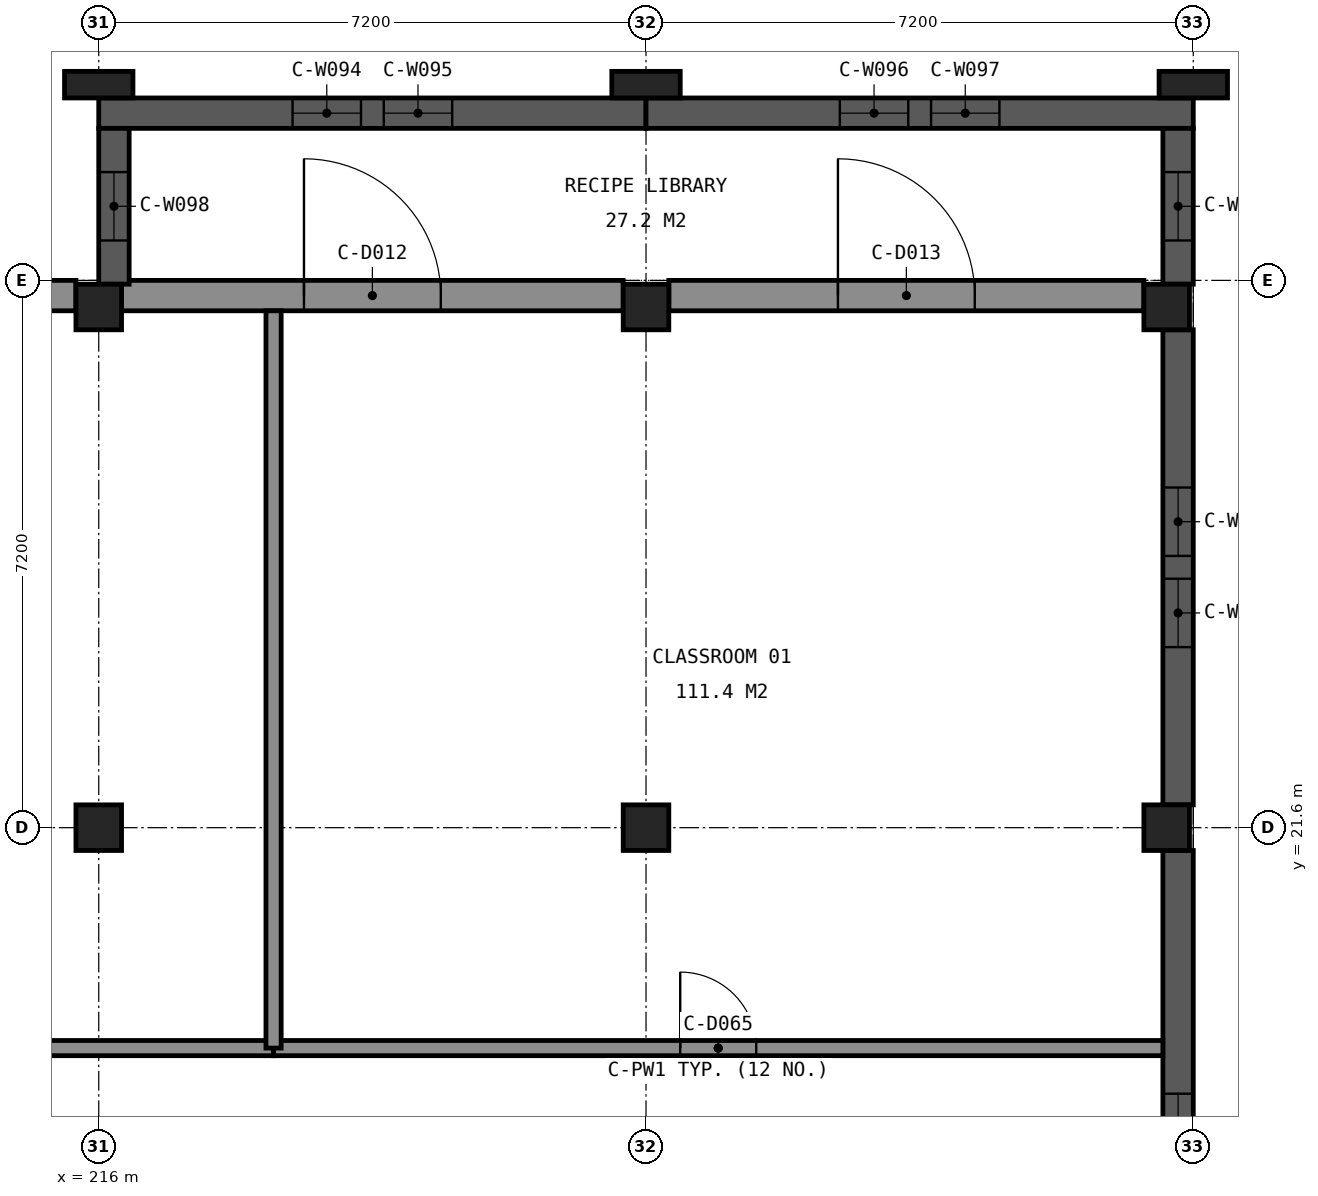
"""IFC4 building model, lengths in metres.
Left out: names, types, materials, properties, quantities, classifications, styles, units other than length and angle.
Written with IfcOpenShell. Run it as: python <this file> out.ifc"""

import sys

from ifc_helpers import new_model, si_unit, direction, frame, frame_2d, origin, origin_2d, place, context, subcontext, project, spatial, rectangle, extrude, element, fill, save


model = new_model("IFC4")
c1 = context("Model", 3, precision=1e-05, world=origin(), true_north=direction((0.0, 1.0)))
c2 = subcontext(c1, "Body", "Model", "MODEL_VIEW")
j1 = project(units=[si_unit("LENGTHUNIT", "METRE"), si_unit("PLANEANGLEUNIT", "RADIAN")], contexts=[c1])
p1 = place(None, origin())
s1 = spatial("IfcSite", under=j1, at=p1, CompositionType="ELEMENT")
p2 = place(p1, origin())
s2 = spatial("IfcBuilding", under=s1, at=p2, CompositionType="ELEMENT")
p3 = place(p2, frame((0.0, 0.0, 9.6)))
s3 = spatial("IfcBuildingStorey", under=s2, at=p3, CompositionType="ELEMENT", Elevation=9.6)
for number, where, z_axis, x_axis in (
    (1, (216.0, 28.45, 0.0), (0.0, 0.0, 1.0), (1.0, 0.0, 0.0)),
    (2, (223.2, 28.45, 0.0), (0.0, 0.0, 1.0), (1.0, 0.0, 0.0)),
    (3, (230.05, 28.45, 0.0), (0.0, 0.0, 1.0), (1.0, 0.0, 0.0)),
    (4, (216.0, 21.6, 0.0), (0.0, 0.0, 1.0), (1.0, 0.0, 0.0)),
    (5, (223.2, 21.6, 0.0), (0.0, 0.0, 1.0), (1.0, 0.0, 0.0)),
    (6, (230.05, 21.6, 0.0), (0.0, 0.0, 1.0), (1.0, 0.0, 0.0)),
):
    element("IfcColumn", number, at=place(p3, frame(where, z_axis=z_axis, x_axis=x_axis)), inside=s3, PredefinedType="COLUMN", context=c2, shape_type="SweptSolid", body=[
        extrude(rectangle(XDim=0.6, YDim=0.6, at=origin_2d()), origin(), (0.0, 0.0, 1.0), 4.8),
    ])
p4 = place(p3, frame((209.1, 28.6, 0.0), z_axis=(0.0, 0.0, 1.0), x_axis=(1.0, 0.0, 0.0)))
e7 = element("IfcWall", 7, at=p4, inside=s3, PredefinedType="SOLIDWALL", context=c2, shape_type="SweptSolid", body=[
    extrude(rectangle(XDim=6.6, YDim=0.4, at=frame_2d((3.3, 0.0))), origin(), (0.0, 0.0, 1.0), 3.95),
])
p5 = place(p4, frame((2.25, 0.0, 0.9)))
e8 = element("IfcOpeningElement", 8, at=p5, cuts=e7, PredefinedType="OPENING", context=c2, shape_type="SweptSolid", body=[
    extrude(rectangle(XDim=0.9, YDim=2.7, at=frame_2d((0.45, 1.35))), frame((0.0, 0.21, 0.0), z_axis=(0.0, -1.0, 0.0), x_axis=(1.0, 0.0, 0.0)), (0.0, 0.0, 1.0), 0.42),
])
p6 = place(p4, frame((3.45, 0.0, 0.9)))
e9 = element("IfcOpeningElement", 9, at=p6, cuts=e7, PredefinedType="OPENING", context=c2, shape_type="SweptSolid", body=[
    extrude(rectangle(XDim=0.9, YDim=2.7, at=frame_2d((0.45, 1.35))), frame((0.0, 0.21, 0.0), z_axis=(0.0, -1.0, 0.0), x_axis=(1.0, 0.0, 0.0)), (0.0, 0.0, 1.0), 0.42),
])
p7 = place(p3, frame((216.3, 28.6, 0.0), z_axis=(0.0, 0.0, 1.0), x_axis=(1.0, 0.0, 0.0)))
e10 = element("IfcWall", 10, at=p7, inside=s3, PredefinedType="SOLIDWALL", context=c2, shape_type="SweptSolid", body=[
    extrude(rectangle(XDim=6.6, YDim=0.4, at=frame_2d((3.3, 0.0))), origin(), (0.0, 0.0, 1.0), 3.95),
])
p8 = place(p7, frame((2.4, 0.0, 0.0)))
e11 = element("IfcOpeningElement", 11, at=p8, cuts=e10, PredefinedType="OPENING", context=c2, shape_type="SweptSolid", body=[
    extrude(rectangle(XDim=1.8, YDim=2.1, at=frame_2d((0.9, 1.05))), frame((0.0, 0.21, 0.0), z_axis=(0.0, -1.0, 0.0), x_axis=(1.0, 0.0, 0.0)), (0.0, 0.0, 1.0), 0.42),
])
p9 = place(p3, frame((223.5, 28.6, 0.0), z_axis=(0.0, 0.0, 1.0), x_axis=(1.0, 0.0, 0.0)))
e12 = element("IfcWall", 12, at=p9, inside=s3, PredefinedType="SOLIDWALL", context=c2, shape_type="SweptSolid", body=[
    extrude(rectangle(XDim=6.25, YDim=0.4, at=frame_2d((3.125, 0.0))), origin(), (0.0, 0.0, 1.0), 3.95),
])
p10 = place(p9, frame((2.225, 0.0, 0.0)))
e13 = element("IfcOpeningElement", 13, at=p10, cuts=e12, PredefinedType="OPENING", context=c2, shape_type="SweptSolid", body=[
    extrude(rectangle(XDim=1.8, YDim=2.1, at=frame_2d((0.9, 1.05))), frame((0.0, 0.21, 0.0), z_axis=(0.0, -1.0, 0.0), x_axis=(1.0, 0.0, 0.0)), (0.0, 0.0, 1.0), 0.42),
])
p11 = place(p3, frame((230.2, 28.15, 0.0), z_axis=(0.0, 0.0, 1.0), x_axis=(0.0, -1.0, 0.0)))
e14 = element("IfcWall", 14, at=p11, inside=s3, PredefinedType="SHEAR", context=c2, shape_type="SweptSolid", body=[
    extrude(rectangle(XDim=6.25, YDim=0.4, at=frame_2d((3.125, 0.0))), origin(), (0.0, 0.0, 1.0), 3.95),
])
p12 = place(p11, frame((2.075, 0.0, 0.9)))
e15 = element("IfcOpeningElement", 15, at=p12, cuts=e14, PredefinedType="OPENING", context=c2, shape_type="SweptSolid", body=[
    extrude(rectangle(XDim=0.9, YDim=2.7, at=frame_2d((0.45, 1.35))), frame((0.0, 0.21, 0.0), z_axis=(0.0, -1.0, 0.0), x_axis=(1.0, 0.0, 0.0)), (0.0, 0.0, 1.0), 0.42),
])
p13 = place(p11, frame((3.275, 0.0, 0.9)))
e16 = element("IfcOpeningElement", 16, at=p13, cuts=e14, PredefinedType="OPENING", context=c2, shape_type="SweptSolid", body=[
    extrude(rectangle(XDim=0.9, YDim=2.7, at=frame_2d((0.45, 1.35))), frame((0.0, 0.21, 0.0), z_axis=(0.0, -1.0, 0.0), x_axis=(1.0, 0.0, 0.0)), (0.0, 0.0, 1.0), 0.42),
])
p14 = place(p3, frame((230.2, 21.3, 0.0), z_axis=(0.0, 0.0, 1.0), x_axis=(0.0, -1.0, 0.0)))
e17 = element("IfcWall", 17, at=p14, inside=s3, PredefinedType="SHEAR", context=c2, shape_type="SweptSolid", body=[
    extrude(rectangle(XDim=6.1, YDim=0.4, at=frame_2d((3.05, 0.0))), origin(), (0.0, 0.0, 1.0), 3.95),
])
p15 = place(p14, frame((3.2, 0.0, 0.9)))
e18 = element("IfcOpeningElement", 18, at=p15, cuts=e17, PredefinedType="OPENING", context=c2, shape_type="SweptSolid", body=[
    extrude(rectangle(XDim=0.9, YDim=2.7, at=frame_2d((0.45, 1.35))), frame((0.0, 0.21, 0.0), z_axis=(0.0, -1.0, 0.0), x_axis=(1.0, 0.0, 0.0)), (0.0, 0.0, 1.0), 0.42),
])
p16 = place(p3, frame((216.0, 31.0, 0.0), z_axis=(0.0, 0.0, 1.0), x_axis=(1.0, 0.0, 0.0)))
e19 = element("IfcWall", 19, at=p16, inside=s3, PredefinedType="SOLIDWALL", context=c2, shape_type="SweptSolid", body=[
    extrude(rectangle(XDim=7.2, YDim=0.4, at=frame_2d((3.6, 0.0))), origin(), (0.0, 0.0, 1.0), 4.55),
])
p17 = place(p16, frame((2.55, 0.0, 0.9)))
e20 = element("IfcOpeningElement", 20, at=p17, cuts=e19, PredefinedType="OPENING", context=c2, shape_type="SweptSolid", body=[
    extrude(rectangle(XDim=0.9, YDim=2.7, at=frame_2d((0.45, 1.35))), frame((0.0, 0.21, 0.0), z_axis=(0.0, -1.0, 0.0), x_axis=(1.0, 0.0, 0.0)), (0.0, 0.0, 1.0), 0.42),
])
p18 = place(p16, frame((3.75, 0.0, 0.9)))
e21 = element("IfcOpeningElement", 21, at=p18, cuts=e19, PredefinedType="OPENING", context=c2, shape_type="SweptSolid", body=[
    extrude(rectangle(XDim=0.9, YDim=2.7, at=frame_2d((0.45, 1.35))), frame((0.0, 0.21, 0.0), z_axis=(0.0, -1.0, 0.0), x_axis=(1.0, 0.0, 0.0)), (0.0, 0.0, 1.0), 0.42),
])
p19 = place(p3, frame((223.2, 31.0, 0.0), z_axis=(0.0, 0.0, 1.0), x_axis=(1.0, 0.0, 0.0)))
e22 = element("IfcWall", 22, at=p19, inside=s3, PredefinedType="SOLIDWALL", context=c2, shape_type="SweptSolid", body=[
    extrude(rectangle(XDim=7.2, YDim=0.4, at=frame_2d((3.6, 0.0))), origin(), (0.0, 0.0, 1.0), 4.55),
])
p20 = place(p19, frame((2.55, 0.0, 0.9)))
e23 = element("IfcOpeningElement", 23, at=p20, cuts=e22, PredefinedType="OPENING", context=c2, shape_type="SweptSolid", body=[
    extrude(rectangle(XDim=0.9, YDim=2.7, at=frame_2d((0.45, 1.35))), frame((0.0, 0.21, 0.0), z_axis=(0.0, -1.0, 0.0), x_axis=(1.0, 0.0, 0.0)), (0.0, 0.0, 1.0), 0.42),
])
p21 = place(p19, frame((3.75, 0.0, 0.9)))
e24 = element("IfcOpeningElement", 24, at=p21, cuts=e22, PredefinedType="OPENING", context=c2, shape_type="SweptSolid", body=[
    extrude(rectangle(XDim=0.9, YDim=2.7, at=frame_2d((0.45, 1.35))), frame((0.0, 0.21, 0.0), z_axis=(0.0, -1.0, 0.0), x_axis=(1.0, 0.0, 0.0)), (0.0, 0.0, 1.0), 0.42),
])
p22 = place(p3, frame((216.2, 28.75, 0.0), z_axis=(0.0, 0.0, 1.0), x_axis=(0.0, 1.0, 0.0)))
e25 = element("IfcWall", 25, at=p22, inside=s3, PredefinedType="SOLIDWALL", context=c2, shape_type="SweptSolid", body=[
    extrude(rectangle(XDim=2.05, YDim=0.4, at=frame_2d((1.025, 0.0))), origin(), (0.0, 0.0, 1.0), 4.55),
])
p23 = place(p22, frame((0.575, 0.0, 0.9)))
e26 = element("IfcOpeningElement", 26, at=p23, cuts=e25, PredefinedType="OPENING", context=c2, shape_type="SweptSolid", body=[
    extrude(rectangle(XDim=0.9, YDim=2.7, at=frame_2d((0.45, 1.35))), frame((0.0, 0.21, 0.0), z_axis=(0.0, -1.0, 0.0), x_axis=(1.0, 0.0, 0.0)), (0.0, 0.0, 1.0), 0.42),
])
p24 = place(p3, frame((230.2, 30.8, 0.0), z_axis=(0.0, 0.0, 1.0), x_axis=(0.0, -1.0, 0.0)))
e27 = element("IfcWall", 27, at=p24, inside=s3, PredefinedType="SOLIDWALL", context=c2, shape_type="SweptSolid", body=[
    extrude(rectangle(XDim=2.05, YDim=0.4, at=frame_2d((1.025, 0.0))), origin(), (0.0, 0.0, 1.0), 4.55),
])
p25 = place(p24, frame((0.575, 0.0, 0.9)))
e28 = element("IfcOpeningElement", 28, at=p25, cuts=e27, PredefinedType="OPENING", context=c2, shape_type="SweptSolid", body=[
    extrude(rectangle(XDim=0.9, YDim=2.7, at=frame_2d((0.45, 1.35))), frame((0.0, 0.21, 0.0), z_axis=(0.0, -1.0, 0.0), x_axis=(1.0, 0.0, 0.0)), (0.0, 0.0, 1.0), 0.42),
])
for number, where, z_axis, x_axis in (
    (29, (216.0, 31.375, 0.0), (0.0, 0.0, 1.0), (1.0, 0.0, 0.0)),
    (30, (223.2, 31.375, 0.0), (0.0, 0.0, 1.0), (1.0, 0.0, 0.0)),
    (31, (230.4, 31.375, 0.0), (0.0, 0.0, 1.0), (1.0, 0.0, 0.0)),
):
    element("IfcColumn", number, at=place(p3, frame(where, z_axis=z_axis, x_axis=x_axis)), inside=s3, PredefinedType="PILASTER", context=c2, shape_type="SweptSolid", body=[
        extrude(rectangle(XDim=0.9, YDim=0.35, at=origin_2d()), origin(), (0.0, 0.0, 1.0), 4.8),
    ])
p26 = place(p3, frame((201.3, 18.7, 0.0), z_axis=(0.0, 0.0, 1.0), x_axis=(1.0, 0.0, 0.0)))
e32 = element("IfcWall", 32, at=p26, inside=s3, PredefinedType="PARTITIONING", context=c2, shape_type="SweptSolid", body=[
    extrude(rectangle(XDim=17.0, YDim=0.2, at=frame_2d((8.5, 0.0))), origin(), (0.0, 0.0, 1.0), 3.95),
])
p27 = place(p26, frame((7.6, 0.0, 0.0)))
e33 = element("IfcOpeningElement", 33, at=p27, cuts=e32, PredefinedType="OPENING", context=c2, shape_type="SweptSolid", body=[
    extrude(rectangle(XDim=1.8, YDim=2.1, at=frame_2d((0.9, 1.05))), frame((0.0, 0.11, 0.0), z_axis=(0.0, -1.0, 0.0), x_axis=(1.0, 0.0, 0.0)), (0.0, 0.0, 1.0), 0.22),
])
p28 = place(p3, frame((218.3, 18.7, 0.0), z_axis=(0.0, 0.0, 1.0), x_axis=(1.0, 0.0, 0.0)))
e34 = element("IfcWall", 34, at=p28, inside=s3, PredefinedType="PARTITIONING", context=c2, shape_type="SweptSolid", body=[
    extrude(rectangle(XDim=11.7, YDim=0.2, at=frame_2d((5.85, 0.0))), origin(), (0.0, 0.0, 1.0), 3.95),
])
p29 = place(p28, frame((5.35, 0.0, 0.0)))
e35 = element("IfcOpeningElement", 35, at=p29, cuts=e34, PredefinedType="OPENING", context=c2, shape_type="SweptSolid", body=[
    extrude(rectangle(XDim=1.0, YDim=2.1, at=frame_2d((0.5, 1.05))), frame((0.0, 0.11, 0.0), z_axis=(0.0, -1.0, 0.0), x_axis=(1.0, 0.0, 0.0)), (0.0, 0.0, 1.0), 0.22),
])
p30 = place(p3, frame((218.3, 28.4, 0.0), z_axis=(0.0, 0.0, 1.0), x_axis=(0.0, -1.0, 0.0)))
e36 = element("IfcWall", 36, at=p30, inside=s3, PredefinedType="PARTITIONING", context=c2, shape_type="SweptSolid", body=[
    extrude(rectangle(XDim=9.7, YDim=0.2, at=frame_2d((4.85, 0.0))), origin(), (0.0, 0.0, 1.0), 3.95),
])
p31 = place(p8, origin())
e37 = element("IfcDoor", 37, at=p31, inside=s3, OperationType="NOTDEFINED", PredefinedType="DOOR", context=c2, shape_type="SweptSolid", body=[
    extrude(rectangle(XDim=1.8, YDim=2.1, at=frame_2d((0.9, 1.05))), frame((0.0, 0.025, 0.0), z_axis=(0.0, -1.0, 0.0), x_axis=(1.0, 0.0, 0.0)), (0.0, 0.0, 1.0), 0.05),
])
fill(e11, e37)
p32 = place(p10, origin())
e38 = element("IfcDoor", 38, at=p32, inside=s3, OperationType="NOTDEFINED", PredefinedType="DOOR", context=c2, shape_type="SweptSolid", body=[
    extrude(rectangle(XDim=1.8, YDim=2.1, at=frame_2d((0.9, 1.05))), frame((0.0, 0.025, 0.0), z_axis=(0.0, -1.0, 0.0), x_axis=(1.0, 0.0, 0.0)), (0.0, 0.0, 1.0), 0.05),
])
fill(e13, e38)
p33 = place(p12, origin())
e39 = element("IfcWindow", 39, at=p33, inside=s3, PartitioningType="SINGLE_PANEL", PredefinedType="WINDOW", context=c2, shape_type="SweptSolid", body=[
    extrude(rectangle(XDim=0.9, YDim=2.7, at=frame_2d((0.45, 1.35))), frame((0.0, -0.09, 0.0), z_axis=(0.0, -1.0, 0.0), x_axis=(1.0, 0.0, 0.0)), (0.0, 0.0, 1.0), 0.06),
])
fill(e15, e39)
p34 = place(p13, origin())
e40 = element("IfcWindow", 40, at=p34, inside=s3, PartitioningType="SINGLE_PANEL", PredefinedType="WINDOW", context=c2, shape_type="SweptSolid", body=[
    extrude(rectangle(XDim=0.9, YDim=2.7, at=frame_2d((0.45, 1.35))), frame((0.0, -0.09, 0.0), z_axis=(0.0, -1.0, 0.0), x_axis=(1.0, 0.0, 0.0)), (0.0, 0.0, 1.0), 0.06),
])
fill(e16, e40)
p35 = place(p15, origin())
e41 = element("IfcWindow", 41, at=p35, inside=s3, PartitioningType="SINGLE_PANEL", PredefinedType="WINDOW", context=c2, shape_type="SweptSolid", body=[
    extrude(rectangle(XDim=0.9, YDim=2.7, at=frame_2d((0.45, 1.35))), frame((0.0, -0.09, 0.0), z_axis=(0.0, -1.0, 0.0), x_axis=(1.0, 0.0, 0.0)), (0.0, 0.0, 1.0), 0.06),
])
fill(e18, e41)
p36 = place(p17, origin())
e42 = element("IfcWindow", 42, at=p36, inside=s3, PartitioningType="SINGLE_PANEL", PredefinedType="WINDOW", context=c2, shape_type="SweptSolid", body=[
    extrude(rectangle(XDim=0.9, YDim=2.7, at=frame_2d((0.45, 1.35))), frame((0.0, -0.09, 0.0), z_axis=(0.0, -1.0, 0.0), x_axis=(1.0, 0.0, 0.0)), (0.0, 0.0, 1.0), 0.06),
])
fill(e20, e42)
p37 = place(p18, origin())
e43 = element("IfcWindow", 43, at=p37, inside=s3, PartitioningType="SINGLE_PANEL", PredefinedType="WINDOW", context=c2, shape_type="SweptSolid", body=[
    extrude(rectangle(XDim=0.9, YDim=2.7, at=frame_2d((0.45, 1.35))), frame((0.0, -0.09, 0.0), z_axis=(0.0, -1.0, 0.0), x_axis=(1.0, 0.0, 0.0)), (0.0, 0.0, 1.0), 0.06),
])
fill(e21, e43)
p38 = place(p20, origin())
e44 = element("IfcWindow", 44, at=p38, inside=s3, PartitioningType="SINGLE_PANEL", PredefinedType="WINDOW", context=c2, shape_type="SweptSolid", body=[
    extrude(rectangle(XDim=0.9, YDim=2.7, at=frame_2d((0.45, 1.35))), frame((0.0, -0.09, 0.0), z_axis=(0.0, -1.0, 0.0), x_axis=(1.0, 0.0, 0.0)), (0.0, 0.0, 1.0), 0.06),
])
fill(e23, e44)
p39 = place(p21, origin())
e45 = element("IfcWindow", 45, at=p39, inside=s3, PartitioningType="SINGLE_PANEL", PredefinedType="WINDOW", context=c2, shape_type="SweptSolid", body=[
    extrude(rectangle(XDim=0.9, YDim=2.7, at=frame_2d((0.45, 1.35))), frame((0.0, -0.09, 0.0), z_axis=(0.0, -1.0, 0.0), x_axis=(1.0, 0.0, 0.0)), (0.0, 0.0, 1.0), 0.06),
])
fill(e24, e45)
p40 = place(p23, origin())
e46 = element("IfcWindow", 46, at=p40, inside=s3, PartitioningType="SINGLE_PANEL", PredefinedType="WINDOW", context=c2, shape_type="SweptSolid", body=[
    extrude(rectangle(XDim=0.9, YDim=2.7, at=frame_2d((0.45, 1.35))), frame((0.0, -0.09, 0.0), z_axis=(0.0, -1.0, 0.0), x_axis=(1.0, 0.0, 0.0)), (0.0, 0.0, 1.0), 0.06),
])
fill(e26, e46)
p41 = place(p25, origin())
e47 = element("IfcWindow", 47, at=p41, inside=s3, PartitioningType="SINGLE_PANEL", PredefinedType="WINDOW", context=c2, shape_type="SweptSolid", body=[
    extrude(rectangle(XDim=0.9, YDim=2.7, at=frame_2d((0.45, 1.35))), frame((0.0, -0.09, 0.0), z_axis=(0.0, -1.0, 0.0), x_axis=(1.0, 0.0, 0.0)), (0.0, 0.0, 1.0), 0.06),
])
fill(e28, e47)
p42 = place(p29, origin())
e48 = element("IfcDoor", 48, at=p42, inside=s3, OperationType="NOTDEFINED", PredefinedType="DOOR", context=c2, shape_type="SweptSolid", body=[
    extrude(rectangle(XDim=1.0, YDim=2.1, at=frame_2d((0.5, 1.05))), frame((0.0, 0.025, 0.0), z_axis=(0.0, -1.0, 0.0), x_axis=(1.0, 0.0, 0.0)), (0.0, 0.0, 1.0), 0.05),
])
fill(e35, e48)
save(model, sys.argv[1])
